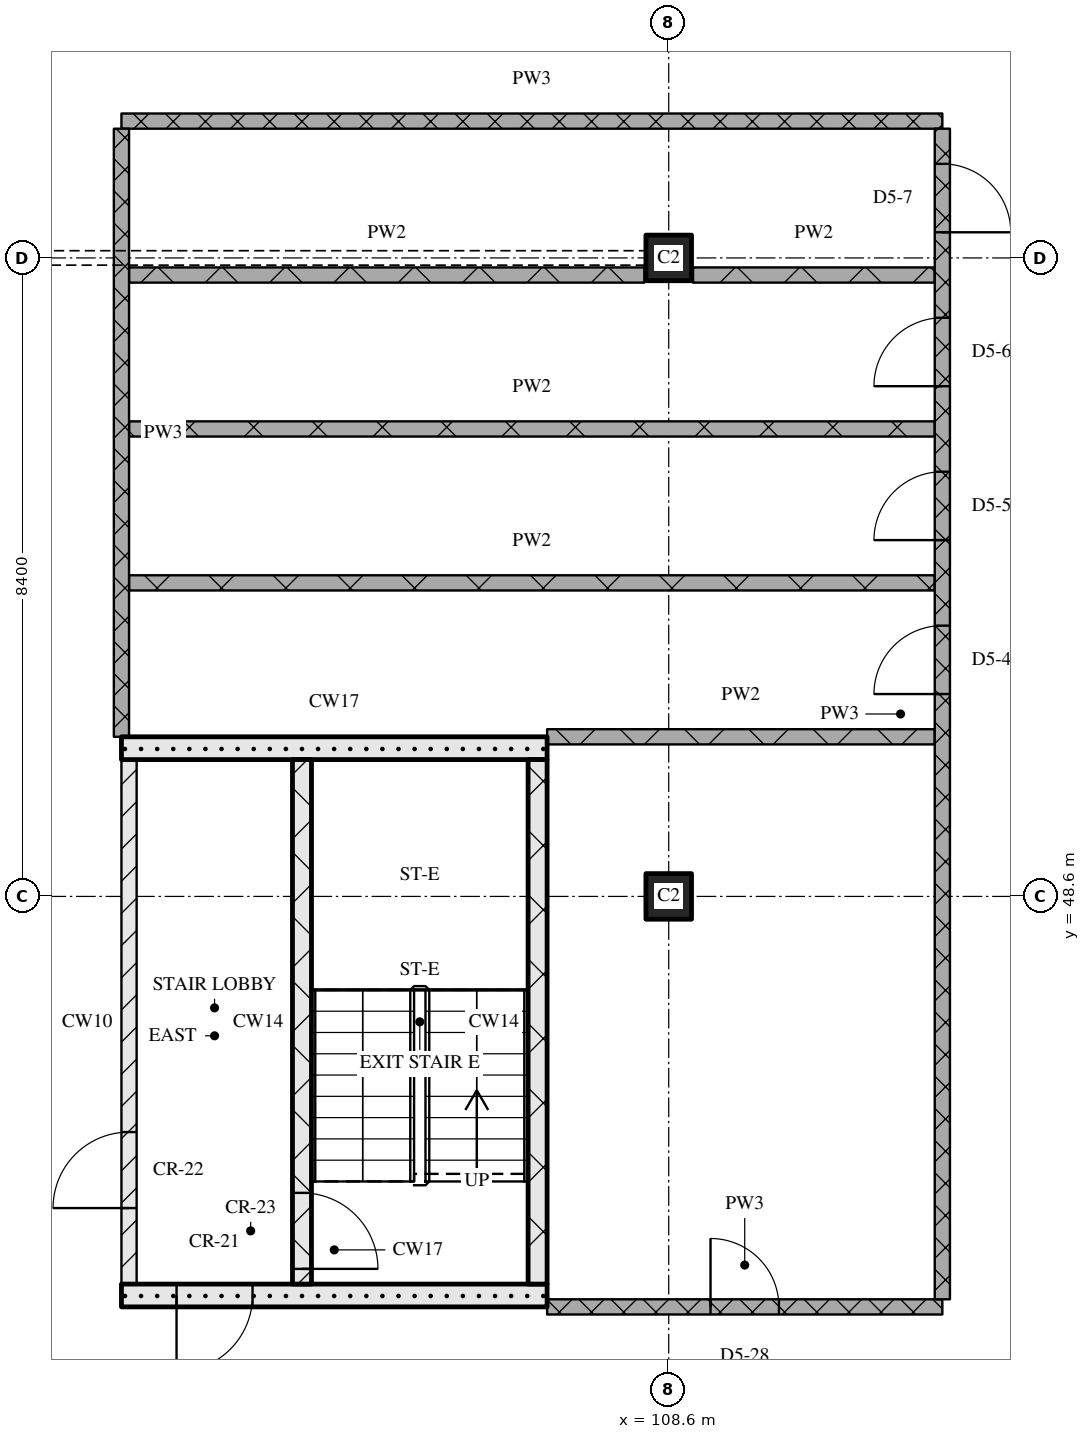
"""IFC4 building model, lengths in metres.
Left out: names, types, materials, properties, quantities, classifications, styles, units other than length and angle.
Written with IfcOpenShell. Run it as: python <this file> out.ifc"""

import sys

from ifc_helpers import new_model, si_unit, direction, frame, frame_2d, origin, origin_2d, place, context, subcontext, project, spatial, rectangle, extrude, element, fill, save


model = new_model("IFC4")
c1 = context("Model", 3, precision=1e-05, world=origin(), true_north=direction((0.0, 1.0)))
c2 = subcontext(c1, "Body", "Model", "MODEL_VIEW")
j1 = project(units=[si_unit("LENGTHUNIT", "METRE"), si_unit("PLANEANGLEUNIT", "RADIAN")], contexts=[c1])
p1 = place(None, origin())
s1 = spatial("IfcSite", under=j1, at=p1, CompositionType="ELEMENT")
p2 = place(p1, origin())
s2 = spatial("IfcBuilding", under=s1, at=p2, CompositionType="ELEMENT")
p3 = place(p2, frame((0.0, 0.0, 248.7)))
s3 = spatial("IfcBuildingStorey", under=s2, at=p3, CompositionType="ELEMENT", Elevation=248.7)
for number, where, z_axis, x_axis in (
    (1, (108.6, 48.6, 0.0), (0.0, 0.0, 1.0), (1.0, 0.0, 0.0)),
    (2, (108.6, 57.0, 0.0), (0.0, 0.0, 1.0), (1.0, 0.0, 0.0)),
):
    element("IfcColumn", number, at=place(p3, frame(where, z_axis=z_axis, x_axis=x_axis)), inside=s3, PredefinedType="COLUMN", context=c2, shape_type="SweptSolid", body=[
        extrude(rectangle(XDim=0.6, YDim=0.6, at=origin_2d()), origin(), (0.0, 0.0, 1.0), 3.6),
    ])
p4 = place(p3, frame((101.4, 43.35, 0.0), z_axis=(0.0, 0.0, 1.0), x_axis=(1.0, 0.0, 0.0)))
e3 = element("IfcWall", 3, at=p4, inside=s3, PredefinedType="SOLIDWALL", context=c2, shape_type="SweptSolid", body=[
    extrude(rectangle(XDim=5.6, YDim=0.3, at=frame_2d((2.8, 0.0))), origin(), (0.0, 0.0, 1.0), 3.3),
])
p5 = place(p4, frame((0.725, 0.0, 0.0)))
e4 = element("IfcOpeningElement", 4, at=p5, cuts=e3, PredefinedType="OPENING", context=c2, shape_type="SweptSolid", body=[
    extrude(rectangle(XDim=1.0, YDim=2.1, at=frame_2d((0.5, 1.05))), frame((0.0, 0.16, 0.0), z_axis=(0.0, -1.0, 0.0), x_axis=(1.0, 0.0, 0.0)), (0.0, 0.0, 1.0), 0.32),
])
p6 = place(p3, frame((101.5, 43.5, 0.0), z_axis=(0.0, 0.0, 1.0), x_axis=(0.0, 1.0, 0.0)))
e5 = element("IfcWall", 5, at=p6, inside=s3, PredefinedType="PARTITIONING", context=c2, shape_type="SweptSolid", body=[
    extrude(rectangle(XDim=6.9, YDim=0.2, at=frame_2d((3.45, 0.0))), origin(), (0.0, 0.0, 1.0), 3.3),
])
p7 = place(p6, frame((1.0, 0.0, 0.0)))
e6 = element("IfcOpeningElement", 6, at=p7, cuts=e5, PredefinedType="OPENING", context=c2, shape_type="SweptSolid", body=[
    extrude(rectangle(XDim=1.0, YDim=2.1, at=frame_2d((0.5, 1.05))), frame((0.0, 0.11, 0.0), z_axis=(0.0, -1.0, 0.0), x_axis=(1.0, 0.0, 0.0)), (0.0, 0.0, 1.0), 0.22),
])
p8 = place(p3, frame((103.775, 43.5, 0.0), z_axis=(0.0, 0.0, 1.0), x_axis=(0.0, 1.0, 0.0)))
e7 = element("IfcWall", 7, at=p8, inside=s3, PredefinedType="SOLIDWALL", context=c2, shape_type="SweptSolid", body=[
    extrude(rectangle(XDim=6.9, YDim=0.25, at=frame_2d((3.45, 0.0))), origin(), (0.0, 0.0, 1.0), 3.3),
])
p9 = place(p8, frame((0.2, 0.0, 0.0)))
e8 = element("IfcOpeningElement", 8, at=p9, cuts=e7, PredefinedType="OPENING", context=c2, shape_type="SweptSolid", body=[
    extrude(rectangle(XDim=1.0, YDim=2.1, at=frame_2d((0.5, 1.05))), frame((0.0, 0.135, 0.0), z_axis=(0.0, -1.0, 0.0), x_axis=(1.0, 0.0, 0.0)), (0.0, 0.0, 1.0), 0.27),
])
p10 = place(p3, frame((106.875, 43.5, 0.0), z_axis=(0.0, 0.0, 1.0), x_axis=(0.0, 1.0, 0.0)))
e9 = element("IfcWall", 9, at=p10, inside=s3, PredefinedType="SOLIDWALL", context=c2, shape_type="SweptSolid", body=[
    extrude(rectangle(XDim=6.9, YDim=0.25, at=frame_2d((3.45, 0.0))), origin(), (0.0, 0.0, 1.0), 3.3),
])
p11 = place(p3, frame((101.4, 50.55, 0.0), z_axis=(0.0, 0.0, 1.0), x_axis=(1.0, 0.0, 0.0)))
e10 = element("IfcWall", 10, at=p11, inside=s3, PredefinedType="SOLIDWALL", context=c2, shape_type="SweptSolid", body=[
    extrude(rectangle(XDim=5.6, YDim=0.3, at=frame_2d((2.8, 0.0))), origin(), (0.0, 0.0, 1.0), 3.3),
])
p12 = place(p3, frame((107.0, 43.2, 0.0), z_axis=(0.0, 0.0, 1.0), x_axis=(1.0, 0.0, 0.0)))
e11 = element("IfcWall", 11, at=p12, inside=s3, PredefinedType="PARTITIONING", context=c2, shape_type="SweptSolid", body=[
    extrude(rectangle(XDim=5.2, YDim=0.2, at=frame_2d((2.6, 0.0))), origin(), (0.0, 0.0, 1.0), 3.3),
])
p13 = place(p12, frame((2.15, 0.0, 0.0)))
e12 = element("IfcOpeningElement", 12, at=p13, cuts=e11, PredefinedType="OPENING", context=c2, shape_type="SweptSolid", body=[
    extrude(rectangle(XDim=0.9, YDim=2.1, at=frame_2d((0.45, 1.05))), frame((0.0, 0.11, 0.0), z_axis=(0.0, -1.0, 0.0), x_axis=(1.0, 0.0, 0.0)), (0.0, 0.0, 1.0), 0.22),
])
p14 = place(p3, frame((107.0, 50.7, 0.0), z_axis=(0.0, 0.0, 1.0), x_axis=(1.0, 0.0, 0.0)))
e13 = element("IfcWall", 13, at=p14, inside=s3, PredefinedType="PARTITIONING", context=c2, shape_type="SweptSolid", body=[
    extrude(rectangle(XDim=5.1, YDim=0.2, at=frame_2d((2.55, 0.0))), origin(), (0.0, 0.0, 1.0), 3.3),
])
for number, where, z_axis, x_axis in (
    (14, (101.5, 52.725, 0.0), (0.0, 0.0, 1.0), (1.0, 0.0, 0.0)),
    (15, (101.5, 54.75, 0.0), (0.0, 0.0, 1.0), (1.0, 0.0, 0.0)),
):
    element("IfcWall", number, at=place(p3, frame(where, z_axis=z_axis, x_axis=x_axis)), inside=s3, PredefinedType="PARTITIONING", context=c2, shape_type="SweptSolid", body=[
        extrude(rectangle(XDim=10.6, YDim=0.2, at=frame_2d((5.3, 0.0))), origin(), (0.0, 0.0, 1.0), 3.3),
    ])
p15 = place(p3, frame((101.5, 56.775, 0.0), z_axis=(0.0, 0.0, 1.0), x_axis=(1.0, 0.0, 0.0)))
e16 = element("IfcWall", 16, at=p15, inside=s3, PredefinedType="PARTITIONING", context=c2, shape_type="SweptSolid", body=[
    extrude(rectangle(XDim=6.78, YDim=0.2, at=frame_2d((3.39, 0.0))), origin(), (0.0, 0.0, 1.0), 3.3),
])
p16 = place(p3, frame((108.92, 56.775, 0.0), z_axis=(0.0, 0.0, 1.0), x_axis=(1.0, 0.0, 0.0)))
e17 = element("IfcWall", 17, at=p16, inside=s3, PredefinedType="PARTITIONING", context=c2, shape_type="SweptSolid", body=[
    extrude(rectangle(XDim=3.18, YDim=0.2, at=frame_2d((1.59, 0.0))), origin(), (0.0, 0.0, 1.0), 3.3),
])
p17 = place(p3, frame((101.4, 58.8, 0.0), z_axis=(0.0, 0.0, 1.0), x_axis=(1.0, 0.0, 0.0)))
e18 = element("IfcWall", 18, at=p17, inside=s3, PredefinedType="PARTITIONING", context=c2, shape_type="SweptSolid", body=[
    extrude(rectangle(XDim=10.8, YDim=0.2, at=frame_2d((5.4, 0.0))), origin(), (0.0, 0.0, 1.0), 3.3),
])
p18 = place(p3, frame((101.4, 58.7, 0.0), z_axis=(0.0, 0.0, 1.0), x_axis=(0.0, -1.0, 0.0)))
e19 = element("IfcWall", 19, at=p18, inside=s3, PredefinedType="PARTITIONING", context=c2, shape_type="SweptSolid", body=[
    extrude(rectangle(XDim=8.0, YDim=0.2, at=frame_2d((4.0, 0.0))), origin(), (0.0, 0.0, 1.0), 3.3),
])
p19 = place(p3, frame((112.2, 43.3, 0.0), z_axis=(0.0, 0.0, 1.0), x_axis=(0.0, 1.0, 0.0)))
e20 = element("IfcWall", 20, at=p19, inside=s3, PredefinedType="PARTITIONING", context=c2, shape_type="SweptSolid", body=[
    extrude(rectangle(XDim=15.4, YDim=0.2, at=frame_2d((7.7, 0.0))), origin(), (0.0, 0.0, 1.0), 3.3),
])
p20 = place(p19, frame((7.962, 0.0, 0.0)))
e21 = element("IfcOpeningElement", 21, at=p20, cuts=e20, PredefinedType="OPENING", context=c2, shape_type="SweptSolid", body=[
    extrude(rectangle(XDim=0.9, YDim=2.1, at=frame_2d((0.45, 1.05))), frame((0.0, 0.11, 0.0), z_axis=(0.0, -1.0, 0.0), x_axis=(1.0, 0.0, 0.0)), (0.0, 0.0, 1.0), 0.22),
])
p21 = place(p19, frame((9.988, 0.0, 0.0)))
e22 = element("IfcOpeningElement", 22, at=p21, cuts=e20, PredefinedType="OPENING", context=c2, shape_type="SweptSolid", body=[
    extrude(rectangle(XDim=0.9, YDim=2.1, at=frame_2d((0.45, 1.05))), frame((0.0, 0.11, 0.0), z_axis=(0.0, -1.0, 0.0), x_axis=(1.0, 0.0, 0.0)), (0.0, 0.0, 1.0), 0.22),
])
p22 = place(p19, frame((12.012, 0.0, 0.0)))
e23 = element("IfcOpeningElement", 23, at=p22, cuts=e20, PredefinedType="OPENING", context=c2, shape_type="SweptSolid", body=[
    extrude(rectangle(XDim=0.9, YDim=2.1, at=frame_2d((0.45, 1.05))), frame((0.0, 0.11, 0.0), z_axis=(0.0, -1.0, 0.0), x_axis=(1.0, 0.0, 0.0)), (0.0, 0.0, 1.0), 0.22),
])
p23 = place(p19, frame((14.038, 0.0, 0.0)))
e24 = element("IfcOpeningElement", 24, at=p23, cuts=e20, PredefinedType="OPENING", context=c2, shape_type="SweptSolid", body=[
    extrude(rectangle(XDim=0.9, YDim=2.1, at=frame_2d((0.45, 1.05))), frame((0.0, 0.11, 0.0), z_axis=(0.0, -1.0, 0.0), x_axis=(1.0, 0.0, 0.0)), (0.0, 0.0, 1.0), 0.22),
])
p24 = place(p5, origin())
e25 = element("IfcDoor", 25, at=p24, inside=s3, OperationType="SINGLE_SWING_RIGHT", PredefinedType="DOOR", context=c2, shape_type="SweptSolid", body=[
    extrude(rectangle(XDim=1.0, YDim=2.1, at=frame_2d((0.5, 1.05))), frame((0.0, 0.025, 0.0), z_axis=(0.0, -1.0, 0.0), x_axis=(1.0, 0.0, 0.0)), (0.0, 0.0, 1.0), 0.05),
])
fill(e4, e25)
p25 = place(p9, origin())
e26 = element("IfcDoor", 26, at=p25, inside=s3, OperationType="SINGLE_SWING_RIGHT", PredefinedType="DOOR", context=c2, shape_type="SweptSolid", body=[
    extrude(rectangle(XDim=1.0, YDim=2.1, at=frame_2d((0.5, 1.05))), frame((0.0, 0.025, 0.0), z_axis=(0.0, -1.0, 0.0), x_axis=(1.0, 0.0, 0.0)), (0.0, 0.0, 1.0), 0.05),
])
fill(e8, e26)
p26 = place(p7, origin())
e27 = element("IfcDoor", 27, at=p26, inside=s3, OperationType="SINGLE_SWING_LEFT", PredefinedType="DOOR", context=c2, shape_type="SweptSolid", body=[
    extrude(rectangle(XDim=1.0, YDim=2.1, at=frame_2d((0.5, 1.05))), frame((0.0, 0.025, 0.0), z_axis=(0.0, -1.0, 0.0), x_axis=(1.0, 0.0, 0.0)), (0.0, 0.0, 1.0), 0.05),
])
fill(e6, e27)
p27 = place(p13, origin())
e28 = element("IfcDoor", 28, at=p27, inside=s3, OperationType="SINGLE_SWING_LEFT", PredefinedType="DOOR", context=c2, shape_type="SweptSolid", body=[
    extrude(rectangle(XDim=0.9, YDim=2.1, at=frame_2d((0.45, 1.05))), frame((0.0, 0.025, 0.0), z_axis=(0.0, -1.0, 0.0), x_axis=(1.0, 0.0, 0.0)), (0.0, 0.0, 1.0), 0.05),
])
fill(e12, e28)
p28 = place(p20, origin())
e29 = element("IfcDoor", 29, at=p28, inside=s3, OperationType="SINGLE_SWING_LEFT", PredefinedType="DOOR", context=c2, shape_type="SweptSolid", body=[
    extrude(rectangle(XDim=0.9, YDim=2.1, at=frame_2d((0.45, 1.05))), frame((0.0, 0.025, 0.0), z_axis=(0.0, -1.0, 0.0), x_axis=(1.0, 0.0, 0.0)), (0.0, 0.0, 1.0), 0.05),
])
fill(e21, e29)
p29 = place(p21, origin())
e30 = element("IfcDoor", 30, at=p29, inside=s3, OperationType="SINGLE_SWING_LEFT", PredefinedType="DOOR", context=c2, shape_type="SweptSolid", body=[
    extrude(rectangle(XDim=0.9, YDim=2.1, at=frame_2d((0.45, 1.05))), frame((0.0, 0.025, 0.0), z_axis=(0.0, -1.0, 0.0), x_axis=(1.0, 0.0, 0.0)), (0.0, 0.0, 1.0), 0.05),
])
fill(e22, e30)
p30 = place(p22, origin())
e31 = element("IfcDoor", 31, at=p30, inside=s3, OperationType="SINGLE_SWING_LEFT", PredefinedType="DOOR", context=c2, shape_type="SweptSolid", body=[
    extrude(rectangle(XDim=0.9, YDim=2.1, at=frame_2d((0.45, 1.05))), frame((0.0, 0.025, 0.0), z_axis=(0.0, -1.0, 0.0), x_axis=(1.0, 0.0, 0.0)), (0.0, 0.0, 1.0), 0.05),
])
fill(e23, e31)
p31 = place(p23, origin())
e32 = element("IfcDoor", 32, at=p31, inside=s3, OperationType="SINGLE_SWING_RIGHT", PredefinedType="DOOR", context=c2, shape_type="SweptSolid", body=[
    extrude(rectangle(XDim=0.9, YDim=2.1, at=frame_2d((0.45, 1.05))), frame((0.0, 0.025, 0.0), z_axis=(0.0, -1.0, 0.0), x_axis=(1.0, 0.0, 0.0)), (0.0, 0.0, 1.0), 0.05),
])
fill(e24, e32)
save(model, sys.argv[1])
